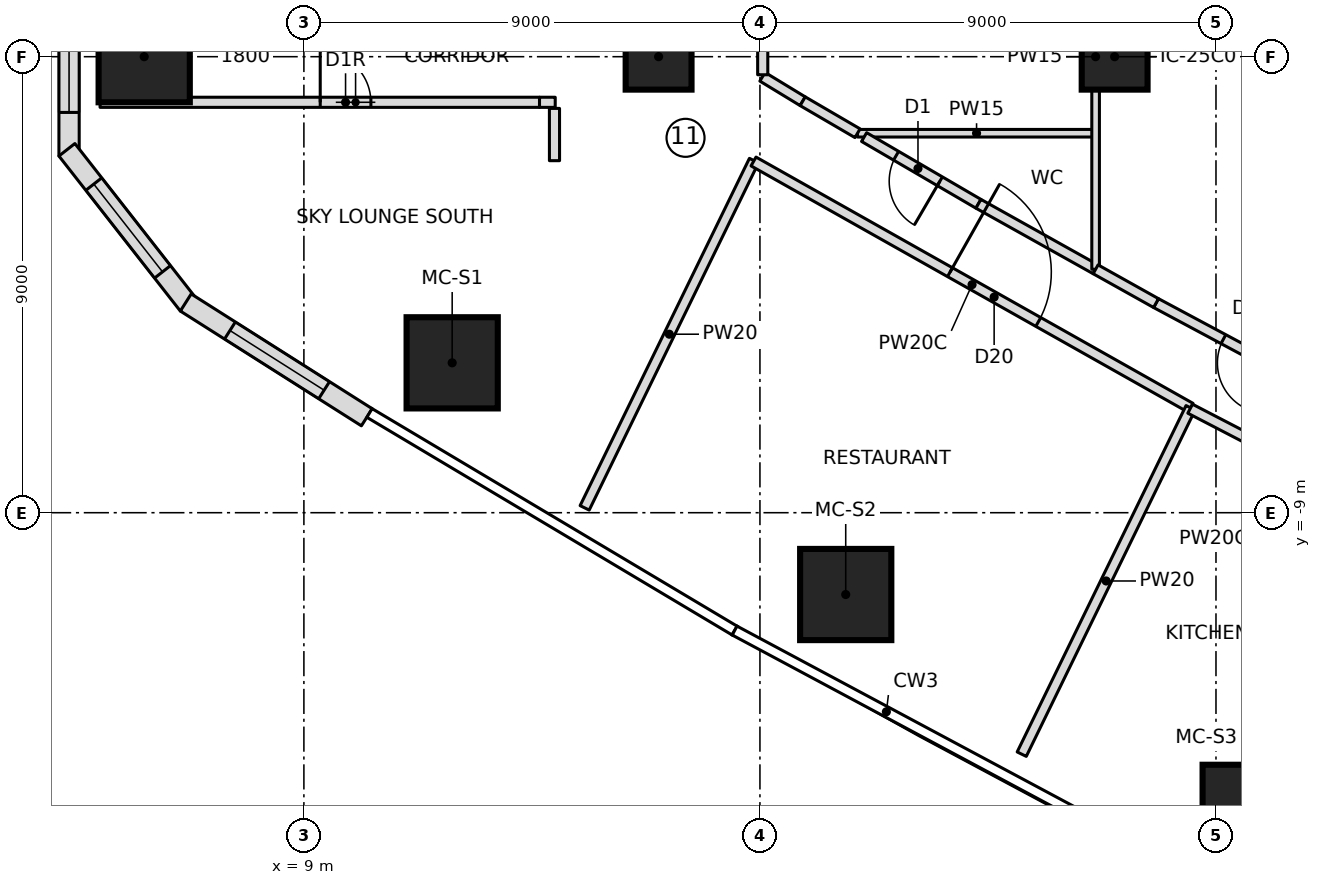
"""IFC4 building model, lengths in metres.
Left out: names, types, materials, properties, quantities, classifications, styles, units other than length and angle.
Written with IfcOpenShell. Run it as: python <this file> out.ifc"""

import sys

from ifc_helpers import new_model, si_unit, direction, frame, frame_2d, origin, origin_2d, place, context, subcontext, project, spatial, polyline, rectangle, outline, extrude, element, fill, save


model = new_model("IFC4")
c1 = context("Model", 3, precision=1e-05, world=origin(), true_north=direction((0.0, 1.0)))
c2 = subcontext(c1, "Body", "Model", "MODEL_VIEW")
j1 = project(units=[si_unit("LENGTHUNIT", "METRE"), si_unit("PLANEANGLEUNIT", "RADIAN")], contexts=[c1])
p1 = place(None, origin())
s1 = spatial("IfcSite", under=j1, at=p1, CompositionType="ELEMENT")
p2 = place(p1, origin())
s2 = spatial("IfcBuilding", under=s1, at=p2, CompositionType="ELEMENT")
p3 = place(p2, frame((0.0, 0.0, 35.0)))
s3 = spatial("IfcBuildingStorey", under=s2, at=p3, CompositionType="ELEMENT", Elevation=35.0)
for number, where, z_axis, x_axis in (
    (1, (5.848, 0.0, 0.0), (0.0, 0.0, 1.0), (1.0, 0.0, 0.0)),
    (2, (11.927, -6.042, 0.0), (0.0, 0.0, 1.0), (1.0, 0.0, 0.0)),
    (3, (19.693, -10.615, 0.0), (0.0, 0.0, 1.0), (1.0, 0.0, 0.0)),
    (4, (27.635, -14.874, 0.0), (0.0, 0.0, 1.0), (1.0, 0.0, 0.0)),
):
    element("IfcColumn", number, at=place(p3, frame(where, z_axis=z_axis, x_axis=x_axis)), inside=s3, PredefinedType="COLUMN", context=c2, shape_type="SweptSolid", body=[
        extrude(rectangle(XDim=1.8, YDim=1.8, at=origin_2d()), origin(), (0.0, 0.0, 1.0), 4.6),
    ])
for number, where, z_axis, x_axis in (
    (5, (16.0, 0.0, 0.0), (0.0, 0.0, 1.0), (1.0, 0.0, 0.0)),
    (6, (25.0, 0.0, 0.0), (0.0, 0.0, 1.0), (1.0, 0.0, 0.0)),
):
    element("IfcColumn", number, at=place(p3, frame(where, z_axis=z_axis, x_axis=x_axis)), inside=s3, PredefinedType="COLUMN", context=c2, shape_type="SweptSolid", body=[
        extrude(rectangle(XDim=1.3, YDim=1.3, at=origin_2d()), origin(), (0.0, 0.0, 1.0), 4.6),
    ])
p4 = place(p3, frame((4.365, 1.891, 0.0), z_axis=(0.0, 0.0, 1.0), x_axis=(0.0, -1.0, 0.0)))
e7 = element("IfcWall", 7, at=p4, inside=s3, PredefinedType="NOTDEFINED", context=c2, shape_type="SweptSolid", body=[
    extrude(outline(polyline([(-0.069, -0.2), (3.852, -0.2), (3.714, 0.2), (0.069, 0.2), (-0.069, -0.2)])), origin(), (0.0, 0.0, 1.0), 4.3),
])
p5 = place(p4, frame((0.792, 0.0, 0.6)))
e8 = element("IfcOpeningElement", 8, at=p5, cuts=e7, PredefinedType="OPENING", context=c2, shape_type="SweptSolid", body=[
    extrude(outline(polyline([(0.0, 1.35), (0.084, 1.771), (0.322, 2.128), (0.679, 2.366), (1.1, 2.45), (1.521, 2.366), (1.878, 2.128), (2.116, 1.771), (2.2, 1.35), (2.2, 1.1), (2.116, 0.679), (1.878, 0.322), (1.521, 0.084), (1.1, 0.0), (0.679, 0.084), (0.322, 0.322), (0.084, 0.679), (0.0, 1.1), (0.0, 1.35)])), frame((0.0, 0.21, 0.0), z_axis=(0.0, -1.0, 0.0), x_axis=(1.0, 0.0, 0.0)), (0.0, 0.0, 1.0), 0.42),
])
p6 = place(p3, frame((4.365, -1.891, 0.0), z_axis=(0.0, 0.0, 1.0), x_axis=(0.616586647779, -0.787287054245, 0.0)))
e9 = element("IfcWall", 9, at=p6, inside=s3, PredefinedType="NOTDEFINED", context=c2, shape_type="SweptSolid", body=[
    extrude(outline(polyline([(-0.069, -0.2), (3.817, -0.2), (3.749, 0.2), (0.069, 0.2), (-0.069, -0.2)])), origin(), (0.0, 0.0, 1.0), 4.3),
])
p7 = place(p6, frame((0.792, 0.0, 0.6)))
e10 = element("IfcOpeningElement", 10, at=p7, cuts=e9, PredefinedType="OPENING", context=c2, shape_type="SweptSolid", body=[
    extrude(outline(polyline([(0.0, 1.35), (0.084, 1.771), (0.322, 2.128), (0.679, 2.366), (1.1, 2.45), (1.521, 2.366), (1.878, 2.128), (2.116, 1.771), (2.2, 1.35), (2.2, 1.1), (2.116, 0.679), (1.878, 0.322), (1.521, 0.084), (1.1, 0.0), (0.679, 0.084), (0.322, 0.322), (0.084, 0.679), (0.0, 1.1), (0.0, 1.35)])), frame((0.0, 0.21, 0.0), z_axis=(0.0, -1.0, 0.0), x_axis=(1.0, 0.0, 0.0)), (0.0, 0.0, 1.0), 0.42),
])
p8 = place(p3, frame((6.698, -4.87, 0.0), z_axis=(0.0, 0.0, 1.0), x_axis=(0.844551578623, -0.535474211372, 0.0)))
e11 = element("IfcWall", 11, at=p8, inside=s3, PredefinedType="NOTDEFINED", context=c2, shape_type="SweptSolid", body=[
    extrude(outline(polyline([(-0.034, -0.2), (4.196, -0.2), (4.196, 0.2), (0.034, 0.2), (-0.034, -0.2)])), origin(), (0.0, 0.0, 1.0), 4.3),
])
p9 = place(p8, frame((0.998, 0.0, 0.6)))
e12 = element("IfcOpeningElement", 12, at=p9, cuts=e11, PredefinedType="OPENING", context=c2, shape_type="SweptSolid", body=[
    extrude(outline(polyline([(0.0, 1.35), (0.084, 1.771), (0.322, 2.128), (0.679, 2.366), (1.1, 2.45), (1.521, 2.366), (1.878, 2.128), (2.116, 1.771), (2.2, 1.35), (2.2, 1.1), (2.116, 0.679), (1.878, 0.322), (1.521, 0.084), (1.1, 0.0), (0.679, 0.084), (0.322, 0.322), (0.084, 0.679), (0.0, 1.1), (0.0, 1.35)])), frame((0.0, 0.21, 0.0), z_axis=(0.0, -1.0, 0.0), x_axis=(1.0, 0.0, 0.0)), (0.0, 0.0, 1.0), 0.42),
])
p10 = place(p3, frame((14.541, -8.904, 0.0), z_axis=(0.0, 0.0, 1.0), x_axis=(0.438213564788, 0.898870887078, 0.0)))
e13 = element("IfcWall", 13, at=p10, inside=s3, PredefinedType="PARTITIONING", context=c2, shape_type="SweptSolid", body=[
    extrude(rectangle(XDim=7.625, YDim=0.2, at=frame_2d((3.813, 0.0))), origin(), (0.0, 0.0, 1.0), 4.3),
])
p11 = place(p3, frame((17.874, -2.068, 0.0), z_axis=(0.0, 0.0, 1.0), x_axis=(0.871165632804, -0.490989246544, 0.0)))
e14 = element("IfcWall", 14, at=p11, inside=s3, PredefinedType="PARTITIONING", context=c2, shape_type="SweptSolid", body=[
    extrude(rectangle(XDim=9.901, YDim=0.2, at=frame_2d((4.951, 0.0))), origin(), (0.0, 0.0, 1.0), 4.3),
])
p12 = place(p11, frame((4.451, 0.0, 0.0)))
e15 = element("IfcOpeningElement", 15, at=p12, cuts=e14, PredefinedType="OPENING", context=c2, shape_type="SweptSolid", body=[
    extrude(rectangle(XDim=2.0, YDim=2.4, at=frame_2d((1.0, 1.2))), frame((0.0, 0.11, 0.0), z_axis=(0.0, -1.0, 0.0), x_axis=(1.0, 0.0, 0.0)), (0.0, 0.0, 1.0), 0.22),
])
p13 = place(p3, frame((23.166, -13.766, 0.0), z_axis=(0.0, 0.0, 1.0), x_axis=(0.438215539964, 0.898869924146, 0.0)))
e16 = element("IfcWall", 16, at=p13, inside=s3, PredefinedType="PARTITIONING", context=c2, shape_type="SweptSolid", body=[
    extrude(rectangle(XDim=7.605, YDim=0.2, at=frame_2d((3.803, 0.0))), origin(), (0.0, 0.0, 1.0), 4.3),
])
p14 = place(p3, frame((26.49, -6.948, 0.0), z_axis=(0.0, 0.0, 1.0), x_axis=(0.887638836985, -0.460540220911, 0.0)))
e17 = element("IfcWall", 17, at=p14, inside=s3, PredefinedType="PARTITIONING", context=c2, shape_type="SweptSolid", body=[
    extrude(rectangle(XDim=4.504, YDim=0.2, at=frame_2d((2.252, 0.0))), origin(), (0.0, 0.0, 1.0), 4.3),
])
p15 = place(p14, frame((1.752, 0.0, 0.0)))
e18 = element("IfcOpeningElement", 18, at=p15, cuts=e17, PredefinedType="OPENING", context=c2, shape_type="SweptSolid", body=[
    extrude(rectangle(XDim=1.2, YDim=2.1, at=frame_2d((0.6, 1.05))), frame((0.0, 0.11, 0.0), z_axis=(0.0, -1.0, 0.0), x_axis=(1.0, 0.0, 0.0)), (0.0, 0.0, 1.0), 0.22),
])
p16 = place(p3, frame((27.157, -15.854, 0.0), z_axis=(0.0, 0.0, 1.0), x_axis=(0.43822365664, 0.898865967072, 0.0)))
e19 = element("IfcWall", 19, at=p16, inside=s3, PredefinedType="PARTITIONING", context=c2, shape_type="SweptSolid", body=[
    extrude(rectangle(XDim=7.601, YDim=0.2, at=frame_2d((3.801, 0.0))), origin(), (0.0, 0.0, 1.0), 4.3),
])
p17 = place(p3, frame((19.926, -1.51, 0.0), z_axis=(0.0, 0.0, 1.0), x_axis=(1.0, 0.0, 0.0)))
e20 = element("IfcWall", 20, at=p17, inside=s3, PredefinedType="PARTITIONING", context=c2, shape_type="SweptSolid", body=[
    extrude(rectangle(XDim=4.699, YDim=0.15, at=frame_2d((2.349, 0.0))), origin(), (0.0, 0.0, 1.0), 4.3),
])
p18 = place(p3, frame((22.312, -2.903, 0.0), z_axis=(0.0, 0.0, 1.0), x_axis=(-0.863687380961, 0.504027884118, 0.0)))
e21 = element("IfcWall", 21, at=p18, inside=s3, PredefinedType="PARTITIONING", context=c2, shape_type="SweptSolid", body=[
    extrude(rectangle(XDim=2.613, YDim=0.2, at=frame_2d((1.306, 0.0))), origin(), (0.0, 0.0, 1.0), 4.3),
])
p19 = place(p18, frame((0.881, 0.0, 0.0)))
e22 = element("IfcOpeningElement", 22, at=p19, cuts=e21, PredefinedType="OPENING", context=c2, shape_type="SweptSolid", body=[
    extrude(rectangle(XDim=1.0, YDim=2.1, at=frame_2d((0.5, 1.05))), frame((0.0, 0.11, 0.0), z_axis=(0.0, -1.0, 0.0), x_axis=(1.0, 0.0, 0.0)), (0.0, 0.0, 1.0), 0.22),
])
p20 = place(p3, frame((24.625, -4.196, 0.0), z_axis=(0.0, 0.0, 1.0), x_axis=(-0.87283266248, 0.48801961365, 0.0)))
e23 = element("IfcWall", 23, at=p20, inside=s3, PredefinedType="PARTITIONING", context=c2, shape_type="SweptSolid", body=[
    extrude(rectangle(XDim=2.649, YDim=0.2, at=frame_2d((1.325, 0.0))), origin(), (0.0, 0.0, 1.0), 4.3),
])
p21 = place(p3, frame((18.844, -0.879, 0.0), z_axis=(0.0, 0.0, 1.0), x_axis=(-0.8542290073, 0.519896915828, 0.0)))
e24 = element("IfcWall", 24, at=p21, inside=s3, PredefinedType="PARTITIONING", context=c2, shape_type="SweptSolid", body=[
    extrude(rectangle(XDim=0.929, YDim=0.2, at=frame_2d((0.464, 0.0))), origin(), (0.0, 0.0, 1.0), 4.3),
])
p22 = place(p3, frame((19.926, -1.51, 0.0), z_axis=(0.0, 0.0, 1.0), x_axis=(-0.8637718337, 0.503883140525, 0.0)))
e25 = element("IfcWall", 25, at=p22, inside=s3, PredefinedType="PARTITIONING", context=c2, shape_type="SweptSolid", body=[
    extrude(rectangle(XDim=1.253, YDim=0.2, at=frame_2d((0.626, 0.0))), origin(), (0.0, 0.0, 1.0), 4.3),
])
p23 = place(p3, frame((24.625, -4.196, 0.0), z_axis=(0.0, 0.0, 1.0), x_axis=(0.0, 1.0, 0.0)))
e26 = element("IfcWall", 26, at=p23, inside=s3, PredefinedType="PARTITIONING", context=c2, shape_type="SweptSolid", body=[
    extrude(rectangle(XDim=8.392, YDim=0.15, at=frame_2d((4.196, 0.0))), origin(), (0.0, 0.0, 1.0), 4.3),
])
p24 = place(p3, frame((29.357, -6.758, 0.0), z_axis=(0.0, 0.0, 1.0), x_axis=(-0.881655245922, 0.471894084874, 0.0)))
e27 = element("IfcWall", 27, at=p24, inside=s3, PredefinedType="PARTITIONING", context=c2, shape_type="SweptSolid", body=[
    extrude(rectangle(XDim=4.016, YDim=0.2, at=frame_2d((2.008, 0.0))), origin(), (0.0, 0.0, 1.0), 4.3),
])
p25 = place(p24, frame((1.508, 0.0, 0.0)))
e28 = element("IfcOpeningElement", 28, at=p25, cuts=e27, PredefinedType="OPENING", context=c2, shape_type="SweptSolid", body=[
    extrude(rectangle(XDim=1.0, YDim=2.1, at=frame_2d((0.5, 1.05))), frame((0.0, 0.11, 0.0), z_axis=(0.0, -1.0, 0.0), x_axis=(1.0, 0.0, 0.0)), (0.0, 0.0, 1.0), 0.22),
])
p26 = place(p3, frame((25.817, -4.863, 0.0), z_axis=(0.0, 0.0, 1.0), x_axis=(-0.872737500828, 0.488189773191, 0.0)))
e29 = element("IfcWall", 29, at=p26, inside=s3, PredefinedType="PARTITIONING", context=c2, shape_type="SweptSolid", body=[
    extrude(rectangle(XDim=1.366, YDim=0.2, at=frame_2d((0.683, 0.0))), origin(), (0.0, 0.0, 1.0), 4.3),
])
p27 = place(p3, frame((4.977, -0.9, 0.0), z_axis=(0.0, 0.0, 1.0), x_axis=(1.0, 0.0, 0.0)))
e30 = element("IfcWall", 30, at=p27, inside=s3, PredefinedType="PARTITIONING", context=c2, shape_type="SweptSolid", body=[
    extrude(rectangle(XDim=8.673, YDim=0.2, at=frame_2d((4.336, 0.0))), origin(), (0.0, 0.0, 1.0), 4.3),
])
p28 = place(p27, frame((4.345, 0.0, 0.0)))
e31 = element("IfcOpeningElement", 31, at=p28, cuts=e30, PredefinedType="OPENING", context=c2, shape_type="SweptSolid", body=[
    extrude(rectangle(XDim=1.0, YDim=2.1, at=frame_2d((0.5, 1.05))), frame((0.0, 0.11, 0.0), z_axis=(0.0, -1.0, 0.0), x_axis=(1.0, 0.0, 0.0)), (0.0, 0.0, 1.0), 0.22),
])
p29 = place(p3, frame((18.055, -0.357, 0.0), z_axis=(0.0, 0.0, 1.0), x_axis=(0.0, 1.0, 0.0)))
e32 = element("IfcWall", 32, at=p29, inside=s3, PredefinedType="PARTITIONING", context=c2, shape_type="SweptSolid", body=[
    extrude(rectangle(XDim=0.713, YDim=0.2, at=frame_2d((0.357, 0.0))), origin(), (0.0, 0.0, 1.0), 4.3),
])
p30 = place(p3, frame((13.65, -0.9, 0.0), z_axis=(0.0, 0.0, 1.0), x_axis=(0.99999876, -0.001574801197, 0.0)))
e33 = element("IfcWall", 33, at=p30, inside=s3, PredefinedType="PARTITIONING", context=c2, shape_type="SweptSolid", body=[
    extrude(rectangle(XDim=0.31, YDim=0.2, at=frame_2d((0.155, 0.0))), origin(), (0.0, 0.0, 1.0), 4.3),
])
p31 = place(p3, frame((13.945, -1.021, 0.0), z_axis=(0.0, 0.0, 1.0), x_axis=(0.000473148752, -0.999999888065, 0.0)))
e34 = element("IfcWall", 34, at=p31, inside=s3, PredefinedType="PARTITIONING", context=c2, shape_type="SweptSolid", body=[
    extrude(rectangle(XDim=1.032, YDim=0.2, at=frame_2d((0.516, 0.0))), origin(), (0.0, 0.0, 1.0), 4.3),
])
p32 = place(p5, origin())
e35 = element("IfcWindow", 35, at=p32, inside=s3, PartitioningType="SINGLE_PANEL", PredefinedType="WINDOW", context=c2, shape_type="SweptSolid", body=[
    extrude(outline(polyline([(0.0, 1.35), (0.084, 1.771), (0.322, 2.128), (0.679, 2.366), (1.1, 2.45), (1.521, 2.366), (1.878, 2.128), (2.116, 1.771), (2.2, 1.35), (2.2, 1.1), (2.116, 0.679), (1.878, 0.322), (1.521, 0.084), (1.1, 0.0), (0.679, 0.084), (0.322, 0.322), (0.084, 0.679), (0.0, 1.1), (0.0, 1.35)])), frame((0.0, 0.17, 0.0), z_axis=(0.0, -1.0, 0.0), x_axis=(1.0, 0.0, 0.0)), (0.0, 0.0, 1.0), 0.06),
])
fill(e8, e35)
p33 = place(p7, origin())
e36 = element("IfcWindow", 36, at=p33, inside=s3, PartitioningType="SINGLE_PANEL", PredefinedType="WINDOW", context=c2, shape_type="SweptSolid", body=[
    extrude(outline(polyline([(0.0, 1.35), (0.084, 1.771), (0.322, 2.128), (0.679, 2.366), (1.1, 2.45), (1.521, 2.366), (1.878, 2.128), (2.116, 1.771), (2.2, 1.35), (2.2, 1.1), (2.116, 0.679), (1.878, 0.322), (1.521, 0.084), (1.1, 0.0), (0.679, 0.084), (0.322, 0.322), (0.084, 0.679), (0.0, 1.1), (0.0, 1.35)])), frame((0.0, 0.17, 0.0), z_axis=(0.0, -1.0, 0.0), x_axis=(1.0, 0.0, 0.0)), (0.0, 0.0, 1.0), 0.06),
])
fill(e10, e36)
p34 = place(p9, origin())
e37 = element("IfcWindow", 37, at=p34, inside=s3, PartitioningType="SINGLE_PANEL", PredefinedType="WINDOW", context=c2, shape_type="SweptSolid", body=[
    extrude(outline(polyline([(0.0, 1.35), (0.084, 1.771), (0.322, 2.128), (0.679, 2.366), (1.1, 2.45), (1.521, 2.366), (1.878, 2.128), (2.116, 1.771), (2.2, 1.35), (2.2, 1.1), (2.116, 0.679), (1.878, 0.322), (1.521, 0.084), (1.1, 0.0), (0.679, 0.084), (0.322, 0.322), (0.084, 0.679), (0.0, 1.1), (0.0, 1.35)])), frame((0.0, 0.17, 0.0), z_axis=(0.0, -1.0, 0.0), x_axis=(1.0, 0.0, 0.0)), (0.0, 0.0, 1.0), 0.06),
])
fill(e12, e37)
p35 = place(p28, origin())
e38 = element("IfcDoor", 38, at=p35, inside=s3, OperationType="SINGLE_SWING_RIGHT", PredefinedType="DOOR", context=c2, shape_type="SweptSolid", body=[
    extrude(rectangle(XDim=1.0, YDim=2.1, at=frame_2d((0.5, 1.05))), frame((0.0, 0.025, 0.0), z_axis=(0.0, -1.0, 0.0), x_axis=(1.0, 0.0, 0.0)), (0.0, 0.0, 1.0), 0.05),
])
fill(e31, e38)
p36 = place(p12, origin())
e39 = element("IfcDoor", 39, at=p36, inside=s3, OperationType="DOUBLE_DOOR_SINGLE_SWING", PredefinedType="DOOR", context=c2, shape_type="SweptSolid", body=[
    extrude(rectangle(XDim=2.0, YDim=2.4, at=frame_2d((1.0, 1.2))), frame((0.0, 0.025, 0.0), z_axis=(0.0, -1.0, 0.0), x_axis=(1.0, 0.0, 0.0)), (0.0, 0.0, 1.0), 0.05),
])
fill(e15, e39)
p37 = place(p19, origin())
e40 = element("IfcDoor", 40, at=p37, inside=s3, OperationType="SINGLE_SWING_LEFT", PredefinedType="DOOR", context=c2, shape_type="SweptSolid", body=[
    extrude(rectangle(XDim=1.0, YDim=2.1, at=frame_2d((0.5, 1.05))), frame((0.0, 0.025, 0.0), z_axis=(0.0, -1.0, 0.0), x_axis=(1.0, 0.0, 0.0)), (0.0, 0.0, 1.0), 0.05),
])
fill(e22, e40)
p38 = place(p25, origin())
e41 = element("IfcDoor", 41, at=p38, inside=s3, OperationType="SINGLE_SWING_LEFT", PredefinedType="DOOR", context=c2, shape_type="SweptSolid", body=[
    extrude(rectangle(XDim=1.0, YDim=2.1, at=frame_2d((0.5, 1.05))), frame((0.0, 0.025, 0.0), z_axis=(0.0, -1.0, 0.0), x_axis=(1.0, 0.0, 0.0)), (0.0, 0.0, 1.0), 0.05),
])
fill(e28, e41)
save(model, sys.argv[1])
